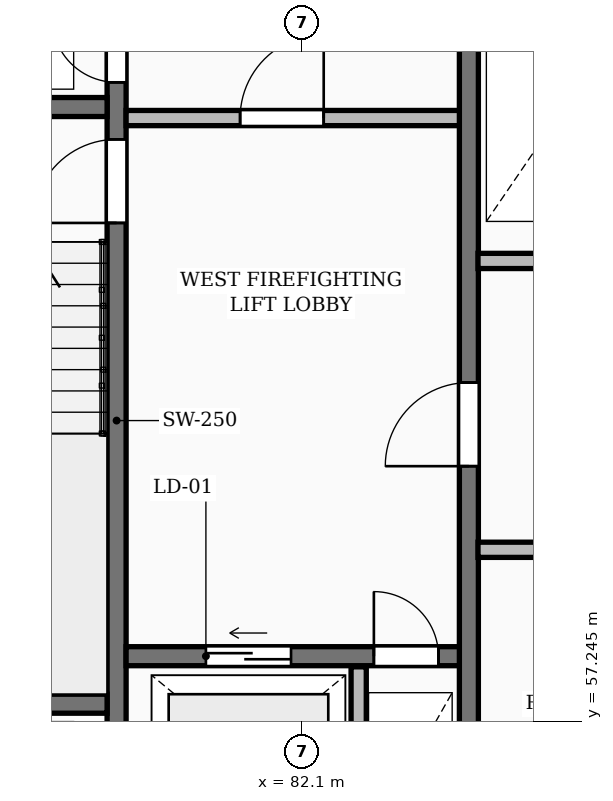
"""IFC4 building model, lengths in metres.
Left out: names, types, materials, properties, quantities, classifications, styles, units other than length and angle.
Written with IfcOpenShell. Run it as: python <this file> out.ifc"""

import sys

from ifc_helpers import new_model, si_unit, direction, frame, frame_2d, origin, place, context, subcontext, project, spatial, rectangle, extrude, element, fill, save


model = new_model("IFC4")
c1 = context("Model", 3, precision=1e-05, world=origin(), true_north=direction((0.0, 1.0)))
c2 = subcontext(c1, "Body", "Model", "MODEL_VIEW")
j1 = project(units=[si_unit("LENGTHUNIT", "METRE"), si_unit("PLANEANGLEUNIT", "RADIAN")], contexts=[c1])
p1 = place(None, origin())
s1 = spatial("IfcSite", under=j1, at=p1, CompositionType="ELEMENT")
p2 = place(p1, origin())
s2 = spatial("IfcBuilding", under=s1, at=p2, CompositionType="ELEMENT")
p3 = place(p2, frame((0.0, 0.0, 142.9)))
s3 = spatial("IfcBuildingStorey", under=s2, at=p3, CompositionType="ELEMENT", Elevation=142.9)
p4 = place(p3, frame((79.665, 55.4, 0.0), z_axis=(0.0, 0.0, 1.0), x_axis=(0.0, 1.0, 0.0)))
e1 = element("IfcWall", 1, at=p4, inside=s3, PredefinedType="SHEAR", context=c2, shape_type="SweptSolid", body=[
    extrude(rectangle(XDim=11.6, YDim=0.25, at=frame_2d((5.8, 0.0))), origin(), (0.0, 0.0, 1.0), 3.6),
])
p5 = place(p4, frame((0.55, 0.0, 0.0)))
e2 = element("IfcOpeningElement", 2, at=p5, cuts=e1, PredefinedType="OPENING", context=c2, shape_type="SweptSolid", body=[
    extrude(rectangle(XDim=0.85, YDim=2.05, at=frame_2d((0.425, 1.025))), frame((0.0, 0.135, 0.0), z_axis=(0.0, -1.0, 0.0), x_axis=(1.0, 0.0, 0.0)), (0.0, 0.0, 1.0), 0.27),
])
p6 = place(p4, frame((8.4, 0.0, 0.0)))
e3 = element("IfcOpeningElement", 3, at=p6, cuts=e1, PredefinedType="OPENING", context=c2, shape_type="SweptSolid", body=[
    extrude(rectangle(XDim=1.1, YDim=2.1, at=frame_2d((0.55, 1.05))), frame((0.0, 0.135, 0.0), z_axis=(0.0, -1.0, 0.0), x_axis=(1.0, 0.0, 0.0)), (0.0, 0.0, 1.0), 0.27),
])
p7 = place(p4, frame((10.25, 0.0, 0.0)))
e4 = element("IfcOpeningElement", 4, at=p7, cuts=e1, PredefinedType="OPENING", context=c2, shape_type="SweptSolid", body=[
    extrude(rectangle(XDim=0.85, YDim=2.05, at=frame_2d((0.425, 1.025))), frame((0.0, 0.135, 0.0), z_axis=(0.0, -1.0, 0.0), x_axis=(1.0, 0.0, 0.0)), (0.0, 0.0, 1.0), 0.27),
])
for number, where, z_axis, x_axis in (
    (5, (76.3, 57.475, 0.0), (0.0, 0.0, 1.0), (1.0, 0.0, 0.0)),
    (6, (76.3, 65.325, 0.0), (0.0, 0.0, 1.0), (1.0, 0.0, 0.0)),
):
    element("IfcWall", number, at=place(p3, frame(where, z_axis=z_axis, x_axis=x_axis)), inside=s3, PredefinedType="SHEAR", context=c2, shape_type="SweptSolid", body=[
        extrude(rectangle(XDim=3.24, YDim=0.25, at=frame_2d((1.62, 0.0))), origin(), (0.0, 0.0, 1.0), 3.6),
    ])
p8 = place(p3, frame((79.79, 58.1, 0.0), z_axis=(0.0, 0.0, 1.0), x_axis=(1.0, 0.0, 0.0)))
e7 = element("IfcWall", 7, at=p8, inside=s3, PredefinedType="SHEAR", context=c2, shape_type="SweptSolid", body=[
    extrude(rectangle(XDim=4.39, YDim=0.25, at=frame_2d((2.195, 0.0))), origin(), (0.0, 0.0, 1.0), 3.6),
])
p9 = place(p8, frame((1.05, 0.0, 0.0)))
e8 = element("IfcOpeningElement", 8, at=p9, cuts=e7, PredefinedType="OPENING", context=c2, shape_type="SweptSolid", body=[
    extrude(rectangle(XDim=1.12, YDim=2.12, at=frame_2d((0.56, 1.06))), frame((0.0, 0.135, 0.0), z_axis=(0.0, -1.0, 0.0), x_axis=(1.0, 0.0, 0.0)), (0.0, 0.0, 1.0), 0.27),
])
p10 = place(p8, frame((3.26, 0.0, 0.0)))
e9 = element("IfcOpeningElement", 9, at=p10, cuts=e7, PredefinedType="OPENING", context=c2, shape_type="SweptSolid", body=[
    extrude(rectangle(XDim=0.85, YDim=2.05, at=frame_2d((0.425, 1.025))), frame((0.0, 0.135, 0.0), z_axis=(0.0, -1.0, 0.0), x_axis=(1.0, 0.0, 0.0)), (0.0, 0.0, 1.0), 0.27),
])
p11 = place(p3, frame((82.85, 55.4, 0.0), z_axis=(0.0, 0.0, 1.0), x_axis=(0.0, 1.0, 0.0)))
e10 = element("IfcWall", 10, at=p11, inside=s3, PredefinedType="PARTITIONING", context=c2, shape_type="SweptSolid", body=[
    extrude(rectangle(XDim=2.56, YDim=0.2, at=frame_2d((1.28, 0.0))), origin(), (0.0, 0.0, 1.0), 3.31),
])
p12 = place(p3, frame((79.79, 65.18, 0.0), z_axis=(0.0, 0.0, 1.0), x_axis=(1.0, 0.0, 0.0)))
e11 = element("IfcWall", 11, at=p12, inside=s3, PredefinedType="PARTITIONING", context=c2, shape_type="SweptSolid", body=[
    extrude(rectangle(XDim=4.39, YDim=0.2, at=frame_2d((2.195, 0.0))), origin(), (0.0, 0.0, 1.0), 3.31),
])
p13 = place(p12, frame((1.5, 0.0, 0.0)))
e12 = element("IfcOpeningElement", 12, at=p13, cuts=e11, PredefinedType="OPENING", context=c2, shape_type="SweptSolid", body=[
    extrude(rectangle(XDim=1.1, YDim=2.1, at=frame_2d((0.55, 1.05))), frame((0.0, 0.11, 0.0), z_axis=(0.0, -1.0, 0.0), x_axis=(1.0, 0.0, 0.0)), (0.0, 0.0, 1.0), 0.22),
])
p14 = place(p3, frame((84.3, 55.4, 0.0), z_axis=(0.0, 0.0, 1.0), x_axis=(0.0, 1.0, 0.0)))
e13 = element("IfcWall", 13, at=p14, inside=s3, PredefinedType="SHEAR", context=c2, shape_type="SweptSolid", body=[
    extrude(rectangle(XDim=11.6, YDim=0.25, at=frame_2d((5.8, 0.0))), origin(), (0.0, 0.0, 1.0), 3.6),
])
p15 = place(p14, frame((5.2, 0.0, 0.0)))
e14 = element("IfcOpeningElement", 14, at=p15, cuts=e13, PredefinedType="OPENING", context=c2, shape_type="SweptSolid", body=[
    extrude(rectangle(XDim=1.1, YDim=2.1, at=frame_2d((0.55, 1.05))), frame((0.0, 0.135, 0.0), z_axis=(0.0, -1.0, 0.0), x_axis=(1.0, 0.0, 0.0)), (0.0, 0.0, 1.0), 0.27),
])
p16 = place(p3, frame((84.42, 59.5, 0.0), z_axis=(0.0, 0.0, 1.0), x_axis=(1.0, 0.0, 0.0)))
e15 = element("IfcWall", 15, at=p16, inside=s3, PredefinedType="PARTITIONING", context=c2, shape_type="SweptSolid", body=[
    extrude(rectangle(XDim=8.36, YDim=0.2, at=frame_2d((4.18, 0.0))), origin(), (0.0, 0.0, 1.0), 3.31),
])
p17 = place(p16, frame((2.1, 0.0, 0.0)))
e16 = element("IfcOpeningElement", 16, at=p17, cuts=e15, PredefinedType="OPENING", context=c2, shape_type="SweptSolid", body=[
    extrude(rectangle(XDim=0.92, YDim=2.08, at=frame_2d((0.46, 1.04))), frame((0.0, 0.11, 0.0), z_axis=(0.0, -1.0, 0.0), x_axis=(1.0, 0.0, 0.0)), (0.0, 0.0, 1.0), 0.22),
])
p18 = place(p16, frame((6.38, 0.0, 0.0)))
e17 = element("IfcOpeningElement", 17, at=p18, cuts=e15, PredefinedType="OPENING", context=c2, shape_type="SweptSolid", body=[
    extrude(rectangle(XDim=1.1, YDim=2.1, at=frame_2d((0.55, 1.05))), frame((0.0, 0.11, 0.0), z_axis=(0.0, -1.0, 0.0), x_axis=(1.0, 0.0, 0.0)), (0.0, 0.0, 1.0), 0.22),
])
p19 = place(p3, frame((84.42, 63.3, 0.0), z_axis=(0.0, 0.0, 1.0), x_axis=(1.0, 0.0, 0.0)))
e18 = element("IfcWall", 18, at=p19, inside=s3, PredefinedType="PARTITIONING", context=c2, shape_type="SweptSolid", body=[
    extrude(rectangle(XDim=19.83, YDim=0.2, at=frame_2d((9.915, 0.0))), origin(), (0.0, 0.0, 1.0), 3.31),
])
p20 = place(p19, frame((1.15, 0.0, 0.0)))
e19 = element("IfcOpeningElement", 19, at=p20, cuts=e18, PredefinedType="OPENING", context=c2, shape_type="SweptSolid", body=[
    extrude(rectangle(XDim=0.85, YDim=2.05, at=frame_2d((0.425, 1.025))), frame((0.0, 0.11, 0.0), z_axis=(0.0, -1.0, 0.0), x_axis=(1.0, 0.0, 0.0)), (0.0, 0.0, 1.0), 0.22),
])
p21 = place(p19, frame((3.25, 0.0, 0.0)))
e20 = element("IfcOpeningElement", 20, at=p21, cuts=e18, PredefinedType="OPENING", context=c2, shape_type="SweptSolid", body=[
    extrude(rectangle(XDim=0.85, YDim=2.05, at=frame_2d((0.425, 1.025))), frame((0.0, 0.11, 0.0), z_axis=(0.0, -1.0, 0.0), x_axis=(1.0, 0.0, 0.0)), (0.0, 0.0, 1.0), 0.22),
])
p22 = place(p19, frame((13.08, 0.0, 0.0)))
e21 = element("IfcOpeningElement", 21, at=p22, cuts=e18, PredefinedType="OPENING", context=c2, shape_type="SweptSolid", body=[
    extrude(rectangle(XDim=1.5, YDim=2.2, at=frame_2d((0.75, 1.1))), frame((0.0, 0.11, 0.0), z_axis=(0.0, -1.0, 0.0), x_axis=(1.0, 0.0, 0.0)), (0.0, 0.0, 1.0), 0.22),
])
p23 = place(p19, frame((6.68, 0.0, 0.0)))
e22 = element("IfcOpeningElement", 22, at=p23, cuts=e18, PredefinedType="OPENING", context=c2, shape_type="SweptSolid", body=[
    extrude(rectangle(XDim=0.92, YDim=2.08, at=frame_2d((0.46, 1.04))), frame((0.0, 0.11, 0.0), z_axis=(0.0, -1.0, 0.0), x_axis=(1.0, 0.0, 0.0)), (0.0, 0.0, 1.0), 0.22),
])
p24 = place(p19, frame((16.33, 0.0, 0.0)))
e23 = element("IfcOpeningElement", 23, at=p24, cuts=e18, PredefinedType="OPENING", context=c2, shape_type="SweptSolid", body=[
    extrude(rectangle(XDim=0.88, YDim=2.06, at=frame_2d((0.44, 1.03))), frame((0.0, 0.11, 0.0), z_axis=(0.0, -1.0, 0.0), x_axis=(1.0, 0.0, 0.0)), (0.0, 0.0, 1.0), 0.22),
])
p25 = place(p6, origin())
e24 = element("IfcDoor", 24, at=p25, inside=s3, OperationType="SINGLE_SWING_LEFT", PredefinedType="DOOR", context=c2, shape_type="SweptSolid", body=[
    extrude(rectangle(XDim=1.1, YDim=2.1, at=frame_2d((0.55, 1.05))), frame((0.0, 0.025, 0.0), z_axis=(0.0, -1.0, 0.0), x_axis=(1.0, 0.0, 0.0)), (0.0, 0.0, 1.0), 0.05),
])
fill(e3, e24)
p26 = place(p7, origin())
e25 = element("IfcDoor", 25, at=p26, inside=s3, OperationType="SINGLE_SWING_RIGHT", PredefinedType="DOOR", context=c2, shape_type="SweptSolid", body=[
    extrude(rectangle(XDim=0.85, YDim=2.05, at=frame_2d((0.425, 1.025))), frame((0.0, 0.025, 0.0), z_axis=(0.0, -1.0, 0.0), x_axis=(1.0, 0.0, 0.0)), (0.0, 0.0, 1.0), 0.05),
])
fill(e4, e25)
p27 = place(p9, origin())
e26 = element("IfcDoor", 26, at=p27, inside=s3, OperationType="SLIDING_TO_LEFT", PredefinedType="DOOR", context=c2, shape_type="SweptSolid", body=[
    extrude(rectangle(XDim=1.12, YDim=2.12, at=frame_2d((0.56, 1.06))), frame((0.0, 0.025, 0.0), z_axis=(0.0, -1.0, 0.0), x_axis=(1.0, 0.0, 0.0)), (0.0, 0.0, 1.0), 0.05),
])
fill(e8, e26)
p28 = place(p10, origin())
e27 = element("IfcDoor", 27, at=p28, inside=s3, OperationType="SINGLE_SWING_LEFT", PredefinedType="DOOR", context=c2, shape_type="SweptSolid", body=[
    extrude(rectangle(XDim=0.85, YDim=2.05, at=frame_2d((0.425, 1.025))), frame((0.0, 0.025, 0.0), z_axis=(0.0, -1.0, 0.0), x_axis=(1.0, 0.0, 0.0)), (0.0, 0.0, 1.0), 0.05),
])
fill(e9, e27)
p29 = place(p13, origin())
e28 = element("IfcDoor", 28, at=p29, inside=s3, OperationType="SINGLE_SWING_RIGHT", PredefinedType="DOOR", context=c2, shape_type="SweptSolid", body=[
    extrude(rectangle(XDim=1.1, YDim=2.1, at=frame_2d((0.55, 1.05))), frame((0.0, 0.025, 0.0), z_axis=(0.0, -1.0, 0.0), x_axis=(1.0, 0.0, 0.0)), (0.0, 0.0, 1.0), 0.05),
])
fill(e12, e28)
p30 = place(p15, origin())
e29 = element("IfcDoor", 29, at=p30, inside=s3, OperationType="SINGLE_SWING_LEFT", PredefinedType="DOOR", context=c2, shape_type="SweptSolid", body=[
    extrude(rectangle(XDim=1.1, YDim=2.1, at=frame_2d((0.55, 1.05))), frame((0.0, 0.025, 0.0), z_axis=(0.0, -1.0, 0.0), x_axis=(1.0, 0.0, 0.0)), (0.0, 0.0, 1.0), 0.05),
])
fill(e14, e29)
save(model, sys.argv[1])
